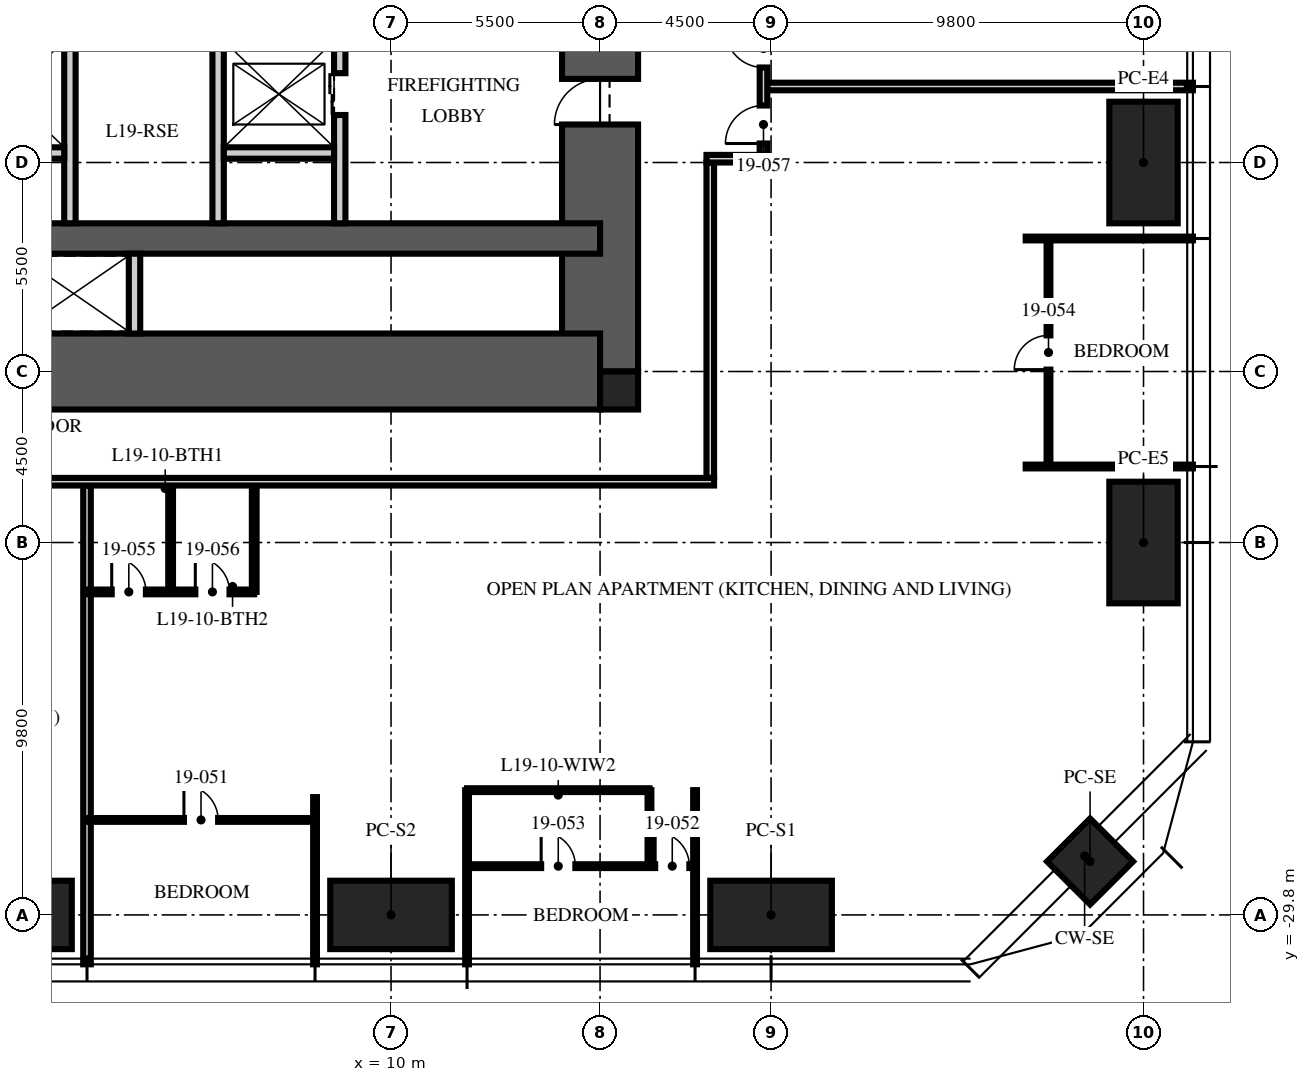
"""IFC4 building model, lengths in metres.
Left out: names, types, materials, properties, quantities, classifications, styles, units other than length and angle.
Written with IfcOpenShell. Run it as: python <this file> out.ifc"""

import sys

from ifc_helpers import new_model, si_unit, direction, frame, frame_2d, origin, origin_2d, place, context, subcontext, project, spatial, rectangle, hollow_rectangle, extrude, element, fill, save


model = new_model("IFC4")
c1 = context("Model", 3, precision=1e-05, world=origin(), true_north=direction((0.0, 1.0)))
c2 = subcontext(c1, "Body", "Model", "MODEL_VIEW")
j1 = project(units=[si_unit("LENGTHUNIT", "METRE"), si_unit("PLANEANGLEUNIT", "RADIAN")], contexts=[c1])
p1 = place(None, origin())
s1 = spatial("IfcSite", under=j1, at=p1, CompositionType="ELEMENT")
p2 = place(p1, origin())
s2 = spatial("IfcBuilding", under=s1, at=p2, CompositionType="ELEMENT")
p3 = place(p2, frame((0.0, 0.0, 77.25)))
s3 = spatial("IfcBuildingStorey", under=s2, at=p3, CompositionType="ELEMENT", Elevation=77.25)
p4 = place(p3, frame((15.5, -15.5, -0.25), z_axis=(0.0, 0.0, 1.0), x_axis=(0.0, 1.0, 0.0)))
e1 = element("IfcWall", 1, at=p4, inside=s3, PredefinedType="SHEAR", context=c2, shape_type="SweptSolid", body=[
    extrude(rectangle(XDim=31.0, YDim=2.0, at=frame_2d((15.5, 0.0))), origin(), (0.0, 0.0, 1.0), 3.75),
])
p5 = place(p4, frame((6.5, 0.0, 0.25)))
e2 = element("IfcOpeningElement", 2, at=p5, cuts=e1, PredefinedType="OPENING", context=c2, shape_type="SweptSolid", body=[
    extrude(rectangle(XDim=1.2, YDim=2.1, at=frame_2d((0.6, 1.05))), frame((0.0, 1.01, 0.0), z_axis=(0.0, -1.0, 0.0), x_axis=(1.0, 0.0, 0.0)), (0.0, 0.0, 1.0), 2.02),
])
p6 = place(p4, frame((23.0, 0.0, 0.25)))
e3 = element("IfcOpeningElement", 3, at=p6, cuts=e1, PredefinedType="OPENING", context=c2, shape_type="SweptSolid", body=[
    extrude(rectangle(XDim=1.8, YDim=2.1, at=frame_2d((0.9, 1.05))), frame((0.0, 1.01, 0.0), z_axis=(0.0, -1.0, 0.0), x_axis=(1.0, 0.0, 0.0)), (0.0, 0.0, 1.0), 2.02),
])
p7 = place(p3, frame((-15.5, -15.5, -0.25), z_axis=(0.0, 0.0, 1.0), x_axis=(1.0, 0.0, 0.0)))
e4 = element("IfcWall", 4, at=p7, inside=s3, PredefinedType="SHEAR", context=c2, shape_type="SweptSolid", body=[
    extrude(rectangle(XDim=31.0, YDim=2.0, at=frame_2d((15.5, 0.0))), origin(), (0.0, 0.0, 1.0), 3.75),
])
p8 = place(p3, frame((-15.5, -12.0, -0.25), z_axis=(0.0, 0.0, 1.0), x_axis=(1.0, 0.0, 0.0)))
e5 = element("IfcWall", 5, at=p8, inside=s3, PredefinedType="SHEAR", context=c2, shape_type="SweptSolid", body=[
    extrude(rectangle(XDim=31.0, YDim=0.8, at=frame_2d((15.5, 0.0))), origin(), (0.0, 0.0, 1.0), 3.75),
])
p9 = place(p3, frame((16.0, -16.0, -0.25), z_axis=(0.0, 0.0, 1.0), x_axis=(1.0, 0.0, 0.0)))
e6 = element("IfcColumn", 6, at=p9, inside=s3, PredefinedType="COLUMN", context=c2, shape_type="SweptSolid", body=[
    extrude(rectangle(XDim=1.0, YDim=1.0, at=origin_2d()), origin(), (0.0, 0.0, 1.0), 3.75),
])
for number, where, z_axis, x_axis in (
    (7, (29.8, -10.0, 0.0), (0.0, 0.0, 1.0), (0.0, 1.0, 0.0)),
    (8, (29.8, -20.0, 0.0), (0.0, 0.0, 1.0), (0.0, 1.0, 0.0)),
    (9, (20.0, -29.8, 0.0), (0.0, 0.0, 1.0), (1.0, 0.0, 0.0)),
    (10, (10.0, -29.8, 0.0), (0.0, 0.0, 1.0), (1.0, 0.0, 0.0)),
    (11, (0.0, -29.8, 0.0), (0.0, 0.0, 1.0), (1.0, 0.0, 0.0)),
):
    element("IfcColumn", number, at=place(p3, frame(where, z_axis=z_axis, x_axis=x_axis)), inside=s3, PredefinedType="COLUMN", context=c2, shape_type="SweptSolid", body=[
        extrude(hollow_rectangle(XDim=3.2, YDim=1.8, WallThickness=0.2, at=origin_2d()), origin(), (0.0, 0.0, 1.0), 3.75),
    ])
p10 = place(p3, frame((28.394, -28.394, 0.0), z_axis=(0.0, 0.0, 1.0), x_axis=(0.707106781187, 0.707106781187, 0.0)))
e12 = element("IfcColumn", 12, at=p10, inside=s3, PredefinedType="COLUMN", context=c2, shape_type="SweptSolid", body=[
    extrude(hollow_rectangle(XDim=1.6, YDim=1.6, WallThickness=0.1, at=origin_2d()), origin(), (0.0, 0.0, 1.0), 3.75),
])
p11 = place(p3, frame((8.65, -11.6, 0.0), z_axis=(0.0, 0.0, 1.0), x_axis=(0.0, 1.0, 0.0)))
e13 = element("IfcWall", 13, at=p11, inside=s3, PredefinedType="PARTITIONING", context=c2, shape_type="SweptSolid", body=[
    extrude(rectangle(XDim=6.7, YDim=0.3, at=frame_2d((3.35, 0.0))), origin(), (0.0, 0.0, 1.0), 3.5),
])
p12 = place(p11, frame((2.85, 0.0, 0.0)))
e14 = element("IfcOpeningElement", 14, at=p12, cuts=e13, PredefinedType="OPENING", context=c2, shape_type="SweptSolid", body=[
    extrude(rectangle(XDim=1.1, YDim=2.1, at=frame_2d((0.55, 1.05))), frame((0.0, 0.16, 0.0), z_axis=(0.0, -1.0, 0.0), x_axis=(1.0, 0.0, 0.0)), (0.0, 0.0, 1.0), 0.32),
])
for number, where, z_axis, x_axis in (
    (15, (1.55, -11.6, 0.0), (0.0, 0.0, 1.0), (0.0, 1.0, 0.0)),
    (16, (5.45, -11.6, 0.0), (0.0, 0.0, 1.0), (0.0, 1.0, 0.0)),
):
    element("IfcWall", number, at=place(p3, frame(where, z_axis=z_axis, x_axis=x_axis)), inside=s3, PredefinedType="PARTITIONING", context=c2, shape_type="SweptSolid", body=[
        extrude(rectangle(XDim=4.8, YDim=0.3, at=frame_2d((2.4, 0.0))), origin(), (0.0, 0.0, 1.0), 3.5),
    ])
for number, where, z_axis, x_axis in (
    (17, (-1.5, -9.75, 0.0), (0.0, 0.0, 1.0), (1.0, 0.0, 0.0)),
    (18, (5.6, -9.75, 0.0), (0.0, 0.0, 1.0), (1.0, 0.0, 0.0)),
):
    element("IfcWall", number, at=place(p3, frame(where, z_axis=z_axis, x_axis=x_axis)), inside=s3, PredefinedType="PARTITIONING", context=c2, shape_type="SweptSolid", body=[
        extrude(rectangle(XDim=2.9, YDim=0.3, at=frame_2d((1.45, 0.0))), origin(), (0.0, 0.0, 1.0), 3.5),
    ])
p13 = place(p3, frame((3.25, -14.5, 0.0), z_axis=(0.0, 0.0, 1.0), x_axis=(0.0, 1.0, 0.0)))
e19 = element("IfcWall", 19, at=p13, inside=s3, PredefinedType="PARTITIONING", context=c2, shape_type="SweptSolid", body=[
    extrude(rectangle(XDim=2.1, YDim=0.3, at=frame_2d((1.05, 0.0))), origin(), (0.0, 0.0, 1.0), 3.5),
])
p14 = place(p3, frame((19.9, -8.0, 0.0), z_axis=(0.0, 0.0, 1.0), x_axis=(1.0, 0.0, 0.0)))
e20 = element("IfcWall", 20, at=p14, inside=s3, PredefinedType="PARTITIONING", context=c2, shape_type="SweptSolid", body=[
    extrude(rectangle(XDim=11.2, YDim=0.2, at=frame_2d((5.6, 0.0))), origin(), (0.0, 0.0, 1.0), 2.71),
])
p15 = place(p3, frame((2.0, -18.5, 0.0), z_axis=(0.0, 0.0, 1.0), x_axis=(0.0, -1.0, 0.0)))
e21 = element("IfcWall", 21, at=p15, inside=s3, PredefinedType="PARTITIONING", context=c2, shape_type="SweptSolid", body=[
    extrude(rectangle(XDim=12.6, YDim=0.2, at=frame_2d((6.3, 0.0))), origin(), (0.0, 0.0, 1.0), 2.71),
])
p16 = place(p3, frame((8.0, -26.7, 0.0), z_axis=(0.0, 0.0, 1.0), x_axis=(0.0, -1.0, 0.0)))
e22 = element("IfcWall", 22, at=p16, inside=s3, PredefinedType="PARTITIONING", context=c2, shape_type="SweptSolid", body=[
    extrude(rectangle(XDim=4.4, YDim=0.1, at=frame_2d((2.2, 0.0))), origin(), (0.0, 0.0, 1.0), 2.71),
])
for number, where, z_axis, x_axis in (
    (23, (12.0, -26.517, 0.0), (0.0, 0.0, 1.0), (0.0, -1.0, 0.0)),
    (24, (18.0, -26.517, 0.0), (0.0, 0.0, 1.0), (0.0, -1.0, 0.0)),
):
    element("IfcWall", number, at=place(p3, frame(where, z_axis=z_axis, x_axis=x_axis)), inside=s3, PredefinedType="PARTITIONING", context=c2, shape_type="SweptSolid", body=[
        extrude(rectangle(XDim=4.583, YDim=0.1, at=frame_2d((2.292, 0.0))), origin(), (0.0, 0.0, 1.0), 2.71),
    ])
for number, where, z_axis, x_axis in (
    (25, (26.7, -18.0, 0.0), (0.0, 0.0, 1.0), (1.0, 0.0, 0.0)),
    (26, (26.7, -12.0, 0.0), (0.0, 0.0, 1.0), (1.0, 0.0, 0.0)),
):
    element("IfcWall", number, at=place(p3, frame(where, z_axis=z_axis, x_axis=x_axis)), inside=s3, PredefinedType="PARTITIONING", context=c2, shape_type="SweptSolid", body=[
        extrude(rectangle(XDim=4.4, YDim=0.1, at=frame_2d((2.2, 0.0))), origin(), (0.0, 0.0, 1.0), 2.71),
    ])
p17 = place(p3, frame((2.0, -27.3, 0.0), z_axis=(0.0, 0.0, 1.0), x_axis=(1.0, 0.0, 0.0)))
e27 = element("IfcWall", 27, at=p17, inside=s3, PredefinedType="PARTITIONING", context=c2, shape_type="SweptSolid", body=[
    extrude(rectangle(XDim=6.0, YDim=0.1, at=frame_2d((3.0, 0.0))), origin(), (0.0, 0.0, 1.0), 2.61),
])
p18 = place(p17, frame((2.55, 0.0, 0.0)))
e28 = element("IfcOpeningElement", 28, at=p18, cuts=e27, PredefinedType="OPENING", context=c2, shape_type="SweptSolid", body=[
    extrude(rectangle(XDim=0.9, YDim=2.1, at=frame_2d((0.45, 1.05))), frame((0.0, 0.06, 0.0), z_axis=(0.0, -1.0, 0.0), x_axis=(1.0, 0.0, 0.0)), (0.0, 0.0, 1.0), 0.12),
])
p19 = place(p3, frame((12.0, -28.517, 0.0), z_axis=(0.0, 0.0, 1.0), x_axis=(1.0, 0.0, 0.0)))
e29 = element("IfcWall", 29, at=p19, inside=s3, PredefinedType="PARTITIONING", context=c2, shape_type="SweptSolid", body=[
    extrude(rectangle(XDim=6.0, YDim=0.1, at=frame_2d((3.0, 0.0))), origin(), (0.0, 0.0, 1.0), 2.61),
])
p20 = place(p19, frame((4.95, 0.0, 0.0)))
e30 = element("IfcOpeningElement", 30, at=p20, cuts=e29, PredefinedType="OPENING", context=c2, shape_type="SweptSolid", body=[
    extrude(rectangle(XDim=0.9, YDim=2.1, at=frame_2d((0.45, 1.05))), frame((0.0, 0.06, 0.0), z_axis=(0.0, -1.0, 0.0), x_axis=(1.0, 0.0, 0.0)), (0.0, 0.0, 1.0), 0.12),
])
p21 = place(p19, frame((1.95, 0.0, 0.0)))
e31 = element("IfcOpeningElement", 31, at=p21, cuts=e29, PredefinedType="OPENING", context=c2, shape_type="SweptSolid", body=[
    extrude(rectangle(XDim=0.9, YDim=2.1, at=frame_2d((0.45, 1.05))), frame((0.0, 0.06, 0.0), z_axis=(0.0, -1.0, 0.0), x_axis=(1.0, 0.0, 0.0)), (0.0, 0.0, 1.0), 0.12),
])
p22 = place(p3, frame((16.8, -26.517, 0.0), z_axis=(0.0, 0.0, 1.0), x_axis=(0.0, -1.0, 0.0)))
e32 = element("IfcWall", 32, at=p22, inside=s3, PredefinedType="PARTITIONING", context=c2, shape_type="SweptSolid", body=[
    extrude(rectangle(XDim=2.0, YDim=0.1, at=frame_2d((1.0, 0.0))), origin(), (0.0, 0.0, 1.0), 3.5),
])
p23 = place(p3, frame((12.0, -26.517, 0.0), z_axis=(0.0, 0.0, 1.0), x_axis=(1.0, 0.0, 0.0)))
e33 = element("IfcWall", 33, at=p23, inside=s3, PredefinedType="PARTITIONING", context=c2, shape_type="SweptSolid", body=[
    extrude(rectangle(XDim=4.8, YDim=0.1, at=frame_2d((2.4, 0.0))), origin(), (0.0, 0.0, 1.0), 2.61),
])
p24 = place(p3, frame((27.3, -18.0, 0.0), z_axis=(0.0, 0.0, 1.0), x_axis=(0.0, 1.0, 0.0)))
e34 = element("IfcWall", 34, at=p24, inside=s3, PredefinedType="PARTITIONING", context=c2, shape_type="SweptSolid", body=[
    extrude(rectangle(XDim=6.0, YDim=0.1, at=frame_2d((3.0, 0.0))), origin(), (0.0, 0.0, 1.0), 2.61),
])
p25 = place(p24, frame((2.55, 0.0, 0.0)))
e35 = element("IfcOpeningElement", 35, at=p25, cuts=e34, PredefinedType="OPENING", context=c2, shape_type="SweptSolid", body=[
    extrude(rectangle(XDim=0.9, YDim=2.1, at=frame_2d((0.45, 1.05))), frame((0.0, 0.06, 0.0), z_axis=(0.0, -1.0, 0.0), x_axis=(1.0, 0.0, 0.0)), (0.0, 0.0, 1.0), 0.12),
])
p26 = place(p3, frame((2.0, -21.3, 0.0), z_axis=(0.0, 0.0, 1.0), x_axis=(1.0, 0.0, 0.0)))
e36 = element("IfcWall", 36, at=p26, inside=s3, PredefinedType="PARTITIONING", context=c2, shape_type="SweptSolid", body=[
    extrude(rectangle(XDim=4.4, YDim=0.125, at=frame_2d((2.2, 0.0))), origin(), (0.0, 0.0, 1.0), 2.61),
])
p27 = place(p26, frame((0.65, 0.0, 0.0)))
e37 = element("IfcOpeningElement", 37, at=p27, cuts=e36, PredefinedType="OPENING", context=c2, shape_type="SweptSolid", body=[
    extrude(rectangle(XDim=0.9, YDim=2.1, at=frame_2d((0.45, 1.05))), frame((0.0, 0.073, 0.0), z_axis=(0.0, -1.0, 0.0), x_axis=(1.0, 0.0, 0.0)), (0.0, 0.0, 1.0), 0.145),
])
p28 = place(p26, frame((2.85, 0.0, 0.0)))
e38 = element("IfcOpeningElement", 38, at=p28, cuts=e36, PredefinedType="OPENING", context=c2, shape_type="SweptSolid", body=[
    extrude(rectangle(XDim=0.9, YDim=2.1, at=frame_2d((0.45, 1.05))), frame((0.0, 0.073, 0.0), z_axis=(0.0, -1.0, 0.0), x_axis=(1.0, 0.0, 0.0)), (0.0, 0.0, 1.0), 0.145),
])
for number, where, z_axis, x_axis in (
    (39, (4.2, -18.5, 0.0), (0.0, 0.0, 1.0), (0.0, -1.0, 0.0)),
    (40, (6.4, -18.5, 0.0), (0.0, 0.0, 1.0), (0.0, -1.0, 0.0)),
):
    element("IfcWall", number, at=place(p3, frame(where, z_axis=z_axis, x_axis=x_axis)), inside=s3, PredefinedType="PARTITIONING", context=c2, shape_type="SweptSolid", body=[
        extrude(rectangle(XDim=2.8, YDim=0.125, at=frame_2d((1.4, 0.0))), origin(), (0.0, 0.0, 1.0), 3.5),
    ])
p29 = place(p3, frame((18.4, -18.3, 0.0), z_axis=(0.0, 0.0, 1.0), x_axis=(0.0, 1.0, 0.0)))
e41 = element("IfcWall", 41, at=p29, inside=s3, PredefinedType="PARTITIONING", context=c2, shape_type="SweptSolid", body=[
    extrude(rectangle(XDim=8.3, YDim=0.2, at=frame_2d((4.15, 0.0))), origin(), (0.0, 0.0, 1.0), 2.3),
])
p30 = place(p3, frame((18.3, -9.9, 0.0), z_axis=(0.0, 0.0, 1.0), x_axis=(1.0, 0.0, 0.0)))
e42 = element("IfcWall", 42, at=p30, inside=s3, PredefinedType="PARTITIONING", context=c2, shape_type="SweptSolid", body=[
    extrude(rectangle(XDim=1.6, YDim=0.2, at=frame_2d((0.8, 0.0))), origin(), (0.0, 0.0, 1.0), 2.492),
])
p31 = place(p3, frame((19.8, -9.8, 0.0), z_axis=(0.0, 0.0, 1.0), x_axis=(0.0, 1.0, 0.0)))
e43 = element("IfcWall", 43, at=p31, inside=s3, PredefinedType="PARTITIONING", context=c2, shape_type="SweptSolid", body=[
    extrude(rectangle(XDim=3.6, YDim=0.2, at=frame_2d((1.8, 0.0))), origin(), (0.0, 0.0, 1.0), 3.5),
])
p32 = place(p31, frame((2.3, 0.0, 0.0)))
e44 = element("IfcOpeningElement", 44, at=p32, cuts=e43, PredefinedType="OPENING", context=c2, shape_type="SweptSolid", body=[
    extrude(rectangle(XDim=1.0, YDim=2.2, at=frame_2d((0.5, 1.1))), frame((0.0, 0.11, 0.0), z_axis=(0.0, -1.0, 0.0), x_axis=(1.0, 0.0, 0.0)), (0.0, 0.0, 1.0), 0.22),
])
p33 = place(p31, frame((0.3, 0.0, 0.0)))
e45 = element("IfcOpeningElement", 45, at=p33, cuts=e43, PredefinedType="OPENING", context=c2, shape_type="SweptSolid", body=[
    extrude(rectangle(XDim=1.0, YDim=2.2, at=frame_2d((0.5, 1.1))), frame((0.0, 0.11, 0.0), z_axis=(0.0, -1.0, 0.0), x_axis=(1.0, 0.0, 0.0)), (0.0, 0.0, 1.0), 0.22),
])
p34 = place(p3, frame((18.5, -18.4, 0.0), z_axis=(0.0, 0.0, 1.0), x_axis=(-1.0, 0.0, 0.0)))
e46 = element("IfcWall", 46, at=p34, inside=s3, PredefinedType="PARTITIONING", context=c2, shape_type="SweptSolid", body=[
    extrude(rectangle(XDim=24.5, YDim=0.2, at=frame_2d((12.25, 0.0))), origin(), (0.0, 0.0, 1.0), 2.3),
])
p35 = place(p5, origin())
e47 = element("IfcDoor", 47, at=p35, inside=s3, OperationType="SINGLE_SWING_LEFT", PredefinedType="DOOR", context=c2, shape_type="SweptSolid", body=[
    extrude(rectangle(XDim=1.2, YDim=2.1, at=frame_2d((0.6, 1.05))), frame((0.0, 0.025, 0.0), z_axis=(0.0, -1.0, 0.0), x_axis=(1.0, 0.0, 0.0)), (0.0, 0.0, 1.0), 0.05),
])
fill(e2, e47)
p36 = place(p12, origin())
e48 = element("IfcDoor", 48, at=p36, inside=s3, OperationType="DOUBLE_DOOR_SLIDING", PredefinedType="DOOR", context=c2, shape_type="SweptSolid", body=[
    extrude(rectangle(XDim=1.1, YDim=2.1, at=frame_2d((0.55, 1.05))), frame((0.0, 0.025, 0.0), z_axis=(0.0, -1.0, 0.0), x_axis=(1.0, 0.0, 0.0)), (0.0, 0.0, 1.0), 0.05),
])
fill(e14, e48)
p37 = place(p32, origin())
e49 = element("IfcDoor", 49, at=p37, inside=s3, OperationType="SINGLE_SWING_RIGHT", PredefinedType="DOOR", context=c2, shape_type="SweptSolid", body=[
    extrude(rectangle(XDim=1.0, YDim=2.2, at=frame_2d((0.5, 1.1))), frame((0.0, 0.025, 0.0), z_axis=(0.0, -1.0, 0.0), x_axis=(1.0, 0.0, 0.0)), (0.0, 0.0, 1.0), 0.05),
])
fill(e44, e49)
p38 = place(p18, origin())
e50 = element("IfcDoor", 50, at=p38, inside=s3, OperationType="SINGLE_SWING_LEFT", PredefinedType="DOOR", context=c2, shape_type="SweptSolid", body=[
    extrude(rectangle(XDim=0.9, YDim=2.1, at=frame_2d((0.45, 1.05))), frame((0.0, 0.025, 0.0), z_axis=(0.0, -1.0, 0.0), x_axis=(1.0, 0.0, 0.0)), (0.0, 0.0, 1.0), 0.05),
])
fill(e28, e50)
p39 = place(p20, origin())
e51 = element("IfcDoor", 51, at=p39, inside=s3, OperationType="SINGLE_SWING_LEFT", PredefinedType="DOOR", context=c2, shape_type="SweptSolid", body=[
    extrude(rectangle(XDim=0.9, YDim=2.1, at=frame_2d((0.45, 1.05))), frame((0.0, 0.025, 0.0), z_axis=(0.0, -1.0, 0.0), x_axis=(1.0, 0.0, 0.0)), (0.0, 0.0, 1.0), 0.05),
])
fill(e30, e51)
p40 = place(p21, origin())
e52 = element("IfcDoor", 52, at=p40, inside=s3, OperationType="SINGLE_SWING_LEFT", PredefinedType="DOOR", context=c2, shape_type="SweptSolid", body=[
    extrude(rectangle(XDim=0.9, YDim=2.1, at=frame_2d((0.45, 1.05))), frame((0.0, 0.025, 0.0), z_axis=(0.0, -1.0, 0.0), x_axis=(1.0, 0.0, 0.0)), (0.0, 0.0, 1.0), 0.05),
])
fill(e31, e52)
p41 = place(p25, origin())
e53 = element("IfcDoor", 53, at=p41, inside=s3, OperationType="SINGLE_SWING_LEFT", PredefinedType="DOOR", context=c2, shape_type="SweptSolid", body=[
    extrude(rectangle(XDim=0.9, YDim=2.1, at=frame_2d((0.45, 1.05))), frame((0.0, 0.025, 0.0), z_axis=(0.0, -1.0, 0.0), x_axis=(1.0, 0.0, 0.0)), (0.0, 0.0, 1.0), 0.05),
])
fill(e35, e53)
p42 = place(p27, origin())
e54 = element("IfcDoor", 54, at=p42, inside=s3, OperationType="SINGLE_SWING_LEFT", PredefinedType="DOOR", context=c2, shape_type="SweptSolid", body=[
    extrude(rectangle(XDim=0.9, YDim=2.1, at=frame_2d((0.45, 1.05))), frame((0.0, 0.025, 0.0), z_axis=(0.0, -1.0, 0.0), x_axis=(1.0, 0.0, 0.0)), (0.0, 0.0, 1.0), 0.05),
])
fill(e37, e54)
p43 = place(p28, origin())
e55 = element("IfcDoor", 55, at=p43, inside=s3, OperationType="SINGLE_SWING_LEFT", PredefinedType="DOOR", context=c2, shape_type="SweptSolid", body=[
    extrude(rectangle(XDim=0.9, YDim=2.1, at=frame_2d((0.45, 1.05))), frame((0.0, 0.025, 0.0), z_axis=(0.0, -1.0, 0.0), x_axis=(1.0, 0.0, 0.0)), (0.0, 0.0, 1.0), 0.05),
])
fill(e38, e55)
p44 = place(p33, origin())
e56 = element("IfcDoor", 56, at=p44, inside=s3, OperationType="SINGLE_SWING_LEFT", PredefinedType="DOOR", context=c2, shape_type="SweptSolid", body=[
    extrude(rectangle(XDim=1.0, YDim=2.2, at=frame_2d((0.5, 1.1))), frame((0.0, 0.025, 0.0), z_axis=(0.0, -1.0, 0.0), x_axis=(1.0, 0.0, 0.0)), (0.0, 0.0, 1.0), 0.05),
])
fill(e45, e56)
save(model, sys.argv[1])
